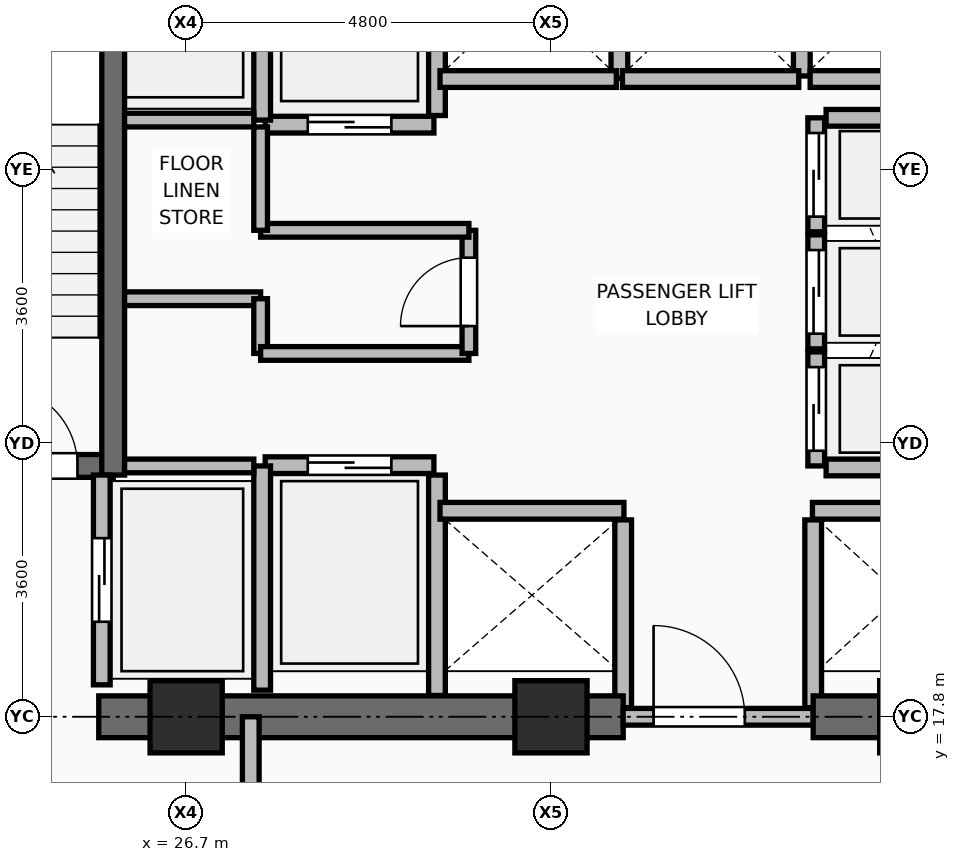
"""IFC4 building model, lengths in metres.
Left out: names, types, materials, properties, quantities, classifications, styles, units other than length and angle.
Written with IfcOpenShell. Run it as: python <this file> out.ifc"""

import sys

from ifc_helpers import new_model, si_unit, direction, frame, frame_2d, origin, origin_2d, place, context, subcontext, project, spatial, rectangle, extrude, element, fill, save


model = new_model("IFC4")
c1 = context("Model", 3, precision=1e-05, world=origin(), true_north=direction((0.0, 1.0)))
c2 = subcontext(c1, "Body", "Model", "MODEL_VIEW")
j1 = project(units=[si_unit("LENGTHUNIT", "METRE"), si_unit("PLANEANGLEUNIT", "RADIAN")], contexts=[c1])
p1 = place(None, origin())
s1 = spatial("IfcSite", under=j1, at=p1, CompositionType="ELEMENT")
p2 = place(p1, origin())
s2 = spatial("IfcBuilding", under=s1, at=p2, CompositionType="ELEMENT")
p3 = place(p2, frame((0.0, 0.0, 145.95)))
s3 = spatial("IfcBuildingStorey", under=s2, at=p3, CompositionType="ELEMENT", Elevation=145.95)
for number, where, z_axis, x_axis in (
    (1, (26.7, 17.8, 0.0), (0.0, 0.0, 1.0), (1.0, 0.0, 0.0)),
    (2, (31.5, 17.8, 0.0), (0.0, 0.0, 1.0), (1.0, 0.0, 0.0)),
    (3, (36.3, 17.8, 0.0), (0.0, 0.0, 1.0), (1.0, 0.0, 0.0)),
):
    element("IfcColumn", number, at=place(p3, frame(where, z_axis=z_axis, x_axis=x_axis)), inside=s3, PredefinedType="COLUMN", context=c2, shape_type="SweptSolid", body=[
        extrude(rectangle(XDim=0.95, YDim=0.95, at=origin_2d()), origin(), (0.0, 0.0, 1.0), 3.75),
    ])
p4 = place(p3, frame((30.0, 18.08, 0.0), z_axis=(0.0, 0.0, 1.0), x_axis=(0.0, 1.0, 0.0)))
e4 = element("IfcWall", 4, at=p4, inside=s3, PredefinedType="PARTITIONING", context=c2, shape_type="SweptSolid", body=[
    extrude(rectangle(XDim=2.9, YDim=0.22, at=frame_2d((1.45, 0.0))), origin(), (0.0, 0.0, 1.0), 3.545),
])
for number, where, z_axis, x_axis in (
    (5, (32.45, 17.92, 0.0), (0.0, 0.0, 1.0), (0.0, 1.0, 0.0)),
    (6, (34.95, 17.92, 0.0), (0.0, 0.0, 1.0), (0.0, 1.0, 0.0)),
):
    element("IfcWall", number, at=place(p3, frame(where, z_axis=z_axis, x_axis=x_axis)), inside=s3, PredefinedType="PARTITIONING", context=c2, shape_type="SweptSolid", body=[
        extrude(rectangle(XDim=2.47, YDim=0.22, at=frame_2d((1.235, 0.0))), origin(), (0.0, 0.0, 1.0), 3.006),
    ])
p5 = place(p3, frame((30.0, 25.71, 0.0), z_axis=(0.0, 0.0, 1.0), x_axis=(0.0, 1.0, 0.0)))
e7 = element("IfcWall", 7, at=p5, inside=s3, PredefinedType="PARTITIONING", context=c2, shape_type="SweptSolid", body=[
    extrude(rectangle(XDim=2.73, YDim=0.22, at=frame_2d((1.365, 0.0))), origin(), (0.0, 0.0, 1.0), 3.545),
])
p6 = place(p3, frame((32.4, 26.2, 0.0), z_axis=(0.0, 0.0, 1.0), x_axis=(0.0, 1.0, 0.0)))
e8 = element("IfcWall", 8, at=p6, inside=s3, PredefinedType="PARTITIONING", context=c2, shape_type="SweptSolid", body=[
    extrude(rectangle(XDim=2.24, YDim=0.22, at=frame_2d((1.12, 0.0))), origin(), (0.0, 0.0, 1.0), 3.545),
])
p7 = place(p3, frame((34.8, 26.23, 0.0), z_axis=(0.0, 0.0, 1.0), x_axis=(0.0, 1.0, 0.0)))
e9 = element("IfcWall", 9, at=p7, inside=s3, PredefinedType="PARTITIONING", context=c2, shape_type="SweptSolid", body=[
    extrude(rectangle(XDim=2.21, YDim=0.22, at=frame_2d((1.105, 0.0))), origin(), (0.0, 0.0, 1.0), 3.545),
])
p8 = place(p3, frame((34.91, 26.19, 0.0), z_axis=(0.0, 0.0, 1.0), x_axis=(1.0, 0.0, 0.0)))
e10 = element("IfcWall", 10, at=p8, inside=s3, PredefinedType="PARTITIONING", context=c2, shape_type="SweptSolid", body=[
    extrude(rectangle(XDim=2.14, YDim=0.22, at=frame_2d((1.07, 0.0))), origin(), (0.0, 0.0, 1.0), 3.545),
])
p9 = place(p3, frame((25.55, 17.8, 0.0), z_axis=(0.0, 0.0, 1.0), x_axis=(1.0, 0.0, 0.0)))
e11 = element("IfcWall", 11, at=p9, inside=s3, PredefinedType="SHEAR", context=c2, shape_type="SweptSolid", body=[
    extrude(rectangle(XDim=6.9, YDim=0.55, at=frame_2d((3.45, 0.0))), origin(), (0.0, 0.0, 1.0), 3.57),
])
p10 = place(p3, frame((32.45, 17.8, 0.0), z_axis=(0.0, 0.0, 1.0), x_axis=(1.0, 0.0, 0.0)))
e12 = element("IfcWall", 12, at=p10, inside=s3, PredefinedType="PARTITIONING", context=c2, shape_type="SweptSolid", body=[
    extrude(rectangle(XDim=2.5, YDim=0.22, at=frame_2d((1.25, 0.0))), origin(), (0.0, 0.0, 1.0), 3.006),
])
p11 = place(p10, frame((0.4, 0.0, 0.0)))
e13 = element("IfcOpeningElement", 13, at=p11, cuts=e12, PredefinedType="OPENING", context=c2, shape_type="SweptSolid", body=[
    extrude(rectangle(XDim=1.2, YDim=2.1, at=frame_2d((0.6, 1.05))), frame((0.0, 0.12, 0.0), z_axis=(0.0, -1.0, 0.0), x_axis=(1.0, 0.0, 0.0)), (0.0, 0.0, 1.0), 0.24),
])
p12 = place(p3, frame((34.95, 17.8, 0.0), z_axis=(0.0, 0.0, 1.0), x_axis=(1.0, 0.0, 0.0)))
e14 = element("IfcWall", 14, at=p12, inside=s3, PredefinedType="SHEAR", context=c2, shape_type="SweptSolid", body=[
    extrude(rectangle(XDim=6.425, YDim=0.55, at=frame_2d((3.212, 0.0))), origin(), (0.0, 0.0, 1.0), 3.57),
])
p13 = place(p3, frame((22.175, 21.1, 0.0), z_axis=(0.0, 0.0, 1.0), x_axis=(1.0, 0.0, 0.0)))
e15 = element("IfcWall", 15, at=p13, inside=s3, PredefinedType="SHEAR", context=c2, shape_type="SweptSolid", body=[
    extrude(rectangle(XDim=3.565, YDim=0.3, at=frame_2d((1.782, 0.0))), origin(), (0.0, 0.0, 1.0), 3.57),
])
p14 = place(p13, frame((2.045, 0.0, 0.0)))
e16 = element("IfcOpeningElement", 16, at=p14, cuts=e15, PredefinedType="OPENING", context=c2, shape_type="SweptSolid", body=[
    extrude(rectangle(XDim=1.05, YDim=2.1, at=frame_2d((0.525, 1.05))), frame((0.0, 0.16, 0.0), z_axis=(0.0, -1.0, 0.0), x_axis=(1.0, 0.0, 0.0)), (0.0, 0.0, 1.0), 0.32),
])
p15 = place(p3, frame((25.74, 20.98, 0.0), z_axis=(0.0, 0.0, 1.0), x_axis=(0.0, 1.0, 0.0)))
e17 = element("IfcWall", 17, at=p15, inside=s3, PredefinedType="SHEAR", context=c2, shape_type="SweptSolid", body=[
    extrude(rectangle(XDim=7.99, YDim=0.3, at=frame_2d((3.995, 0.0))), origin(), (0.0, 0.0, 1.0), 3.57),
])
p16 = place(p3, frame((25.59, 18.22, 0.0), z_axis=(0.0, 0.0, 1.0), x_axis=(0.0, 1.0, 0.0)))
e18 = element("IfcWall", 18, at=p16, inside=s3, PredefinedType="PARTITIONING", context=c2, shape_type="SweptSolid", body=[
    extrude(rectangle(XDim=2.76, YDim=0.22, at=frame_2d((1.38, 0.0))), origin(), (0.0, 0.0, 1.0), 3.55),
])
p17 = place(p16, frame((0.83, 0.0, 0.0)))
e19 = element("IfcOpeningElement", 19, at=p17, cuts=e18, PredefinedType="OPENING", context=c2, shape_type="SweptSolid", body=[
    extrude(rectangle(XDim=1.1, YDim=2.2, at=frame_2d((0.55, 1.1))), frame((0.0, 0.12, 0.0), z_axis=(0.0, -1.0, 0.0), x_axis=(1.0, 0.0, 0.0)), (0.0, 0.0, 1.0), 0.24),
])
p18 = place(p3, frame((27.74, 21.11, 0.0), z_axis=(0.0, 0.0, 1.0), x_axis=(1.0, 0.0, 0.0)))
e20 = element("IfcWall", 20, at=p18, inside=s3, PredefinedType="PARTITIONING", context=c2, shape_type="SweptSolid", body=[
    extrude(rectangle(XDim=2.22, YDim=0.22, at=frame_2d((1.11, 0.0))), origin(), (0.0, 0.0, 1.0), 3.55),
])
p19 = place(p18, frame((0.56, 0.0, 0.0)))
e21 = element("IfcOpeningElement", 21, at=p19, cuts=e20, PredefinedType="OPENING", context=c2, shape_type="SweptSolid", body=[
    extrude(rectangle(XDim=1.1, YDim=2.2, at=frame_2d((0.55, 1.1))), frame((0.0, 0.12, 0.0), z_axis=(0.0, -1.0, 0.0), x_axis=(1.0, 0.0, 0.0)), (0.0, 0.0, 1.0), 0.24),
])
p20 = place(p3, frame((27.74, 25.59, 0.0), z_axis=(0.0, 0.0, 1.0), x_axis=(1.0, 0.0, 0.0)))
e22 = element("IfcWall", 22, at=p20, inside=s3, PredefinedType="PARTITIONING", context=c2, shape_type="SweptSolid", body=[
    extrude(rectangle(XDim=2.22, YDim=0.22, at=frame_2d((1.11, 0.0))), origin(), (0.0, 0.0, 1.0), 3.55),
])
p21 = place(p20, frame((0.56, 0.0, 0.0)))
e23 = element("IfcOpeningElement", 23, at=p21, cuts=e22, PredefinedType="OPENING", context=c2, shape_type="SweptSolid", body=[
    extrude(rectangle(XDim=1.1, YDim=2.2, at=frame_2d((0.55, 1.1))), frame((0.0, 0.12, 0.0), z_axis=(0.0, -1.0, 0.0), x_axis=(1.0, 0.0, 0.0)), (0.0, 0.0, 1.0), 0.24),
])
p22 = place(p3, frame((30.04, 20.51, 0.0), z_axis=(0.0, 0.0, 1.0), x_axis=(1.0, 0.0, 0.0)))
e24 = element("IfcWall", 24, at=p22, inside=s3, PredefinedType="PARTITIONING", context=c2, shape_type="SweptSolid", body=[
    extrude(rectangle(XDim=2.42, YDim=0.22, at=frame_2d((1.21, 0.0))), origin(), (0.0, 0.0, 1.0), 3.55),
])
p23 = place(p3, frame((34.94, 20.51, 0.0), z_axis=(0.0, 0.0, 1.0), x_axis=(1.0, 0.0, 0.0)))
e25 = element("IfcWall", 25, at=p23, inside=s3, PredefinedType="PARTITIONING", context=c2, shape_type="SweptSolid", body=[
    extrude(rectangle(XDim=2.24, YDim=0.22, at=frame_2d((1.12, 0.0))), origin(), (0.0, 0.0, 1.0), 3.55),
])
for number, where, z_axis, x_axis in (
    (26, (30.04, 26.19, 0.0), (0.0, 0.0, 1.0), (1.0, 0.0, 0.0)),
    (27, (32.44, 26.19, 0.0), (0.0, 0.0, 1.0), (1.0, 0.0, 0.0)),
):
    element("IfcWall", number, at=place(p3, frame(where, z_axis=z_axis, x_axis=x_axis)), inside=s3, PredefinedType="PARTITIONING", context=c2, shape_type="SweptSolid", body=[
        extrude(rectangle(XDim=2.32, YDim=0.22, at=frame_2d((1.16, 0.0))), origin(), (0.0, 0.0, 1.0), 3.55),
    ])
p24 = place(p3, frame((34.99, 21.1, 0.0), z_axis=(0.0, 0.0, 1.0), x_axis=(0.0, 1.0, 0.0)))
e28 = element("IfcWall", 28, at=p24, inside=s3, PredefinedType="PARTITIONING", context=c2, shape_type="SweptSolid", body=[
    extrude(rectangle(XDim=1.5, YDim=0.22, at=frame_2d((0.75, 0.0))), origin(), (0.0, 0.0, 1.0), 3.55),
])
p25 = place(p24, frame((0.2, 0.0, 0.0)))
e29 = element("IfcOpeningElement", 29, at=p25, cuts=e28, PredefinedType="OPENING", context=c2, shape_type="SweptSolid", body=[
    extrude(rectangle(XDim=1.1, YDim=2.2, at=frame_2d((0.55, 1.1))), frame((0.0, 0.12, 0.0), z_axis=(0.0, -1.0, 0.0), x_axis=(1.0, 0.0, 0.0)), (0.0, 0.0, 1.0), 0.24),
])
p26 = place(p3, frame((34.99, 22.64, 0.0), z_axis=(0.0, 0.0, 1.0), x_axis=(0.0, 1.0, 0.0)))
e30 = element("IfcWall", 30, at=p26, inside=s3, PredefinedType="PARTITIONING", context=c2, shape_type="SweptSolid", body=[
    extrude(rectangle(XDim=1.5, YDim=0.22, at=frame_2d((0.75, 0.0))), origin(), (0.0, 0.0, 1.0), 3.55),
])
p27 = place(p26, frame((0.2, 0.0, 0.0)))
e31 = element("IfcOpeningElement", 31, at=p27, cuts=e30, PredefinedType="OPENING", context=c2, shape_type="SweptSolid", body=[
    extrude(rectangle(XDim=1.1, YDim=2.2, at=frame_2d((0.55, 1.1))), frame((0.0, 0.12, 0.0), z_axis=(0.0, -1.0, 0.0), x_axis=(1.0, 0.0, 0.0)), (0.0, 0.0, 1.0), 0.24),
])
p28 = place(p3, frame((34.99, 24.18, 0.0), z_axis=(0.0, 0.0, 1.0), x_axis=(0.0, 1.0, 0.0)))
e32 = element("IfcWall", 32, at=p28, inside=s3, PredefinedType="PARTITIONING", context=c2, shape_type="SweptSolid", body=[
    extrude(rectangle(XDim=1.5, YDim=0.22, at=frame_2d((0.75, 0.0))), origin(), (0.0, 0.0, 1.0), 3.55),
])
p29 = place(p28, frame((0.2, 0.0, 0.0)))
e33 = element("IfcOpeningElement", 33, at=p29, cuts=e32, PredefinedType="OPENING", context=c2, shape_type="SweptSolid", body=[
    extrude(rectangle(XDim=1.1, YDim=2.2, at=frame_2d((0.55, 1.1))), frame((0.0, 0.12, 0.0), z_axis=(0.0, -1.0, 0.0), x_axis=(1.0, 0.0, 0.0)), (0.0, 0.0, 1.0), 0.24),
])
p30 = place(p3, frame((27.7, 18.15, 0.0), z_axis=(0.0, 0.0, 1.0), x_axis=(0.0, 1.0, 0.0)))
e34 = element("IfcWall", 34, at=p30, inside=s3, PredefinedType="PARTITIONING", context=c2, shape_type="SweptSolid", body=[
    extrude(rectangle(XDim=2.95, YDim=0.22, at=frame_2d((1.475, 0.0))), origin(), (0.0, 0.0, 1.0), 3.55),
])
p31 = place(p3, frame((27.7, 25.65, 0.0), z_axis=(0.0, 0.0, 1.0), x_axis=(0.0, 1.0, 0.0)))
e35 = element("IfcWall", 35, at=p31, inside=s3, PredefinedType="PARTITIONING", context=c2, shape_type="SweptSolid", body=[
    extrude(rectangle(XDim=3.0, YDim=0.22, at=frame_2d((1.5, 0.0))), origin(), (0.0, 0.0, 1.0), 3.55),
])
for number, where, z_axis, x_axis in (
    (36, (35.12, 21.08, 0.0), (0.0, 0.0, 1.0), (1.0, 0.0, 0.0)),
    (37, (35.12, 25.68, 0.0), (0.0, 0.0, 1.0), (1.0, 0.0, 0.0)),
):
    element("IfcWall", number, at=place(p3, frame(where, z_axis=z_axis, x_axis=x_axis)), inside=s3, PredefinedType="PARTITIONING", context=c2, shape_type="SweptSolid", body=[
        extrude(rectangle(XDim=1.94, YDim=0.22, at=frame_2d((0.97, 0.0))), origin(), (0.0, 0.0, 1.0), 3.55),
    ])
for number, where, z_axis, x_axis in (
    (38, (25.89, 21.1, 0.0), (0.0, 0.0, 1.0), (1.0, 0.0, 0.0)),
    (39, (25.89, 25.65, 0.0), (0.0, 0.0, 1.0), (1.0, 0.0, 0.0)),
):
    element("IfcWall", number, at=place(p3, frame(where, z_axis=z_axis, x_axis=x_axis)), inside=s3, PredefinedType="PARTITIONING", context=c2, shape_type="SweptSolid", body=[
        extrude(rectangle(XDim=1.7, YDim=0.18, at=frame_2d((0.85, 0.0))), origin(), (0.0, 0.0, 1.0), 3.55),
    ])
p32 = place(p3, frame((25.89, 23.3, 0.0), z_axis=(0.0, 0.0, 1.0), x_axis=(1.0, 0.0, 0.0)))
e40 = element("IfcWall", 40, at=p32, inside=s3, PredefinedType="PARTITIONING", context=c2, shape_type="SweptSolid", body=[
    extrude(rectangle(XDim=1.79, YDim=0.18, at=frame_2d((0.895, 0.0))), origin(), (0.0, 0.0, 1.0), 3.55),
])
p33 = place(p3, frame((27.68, 22.58, 0.0), z_axis=(0.0, 0.0, 1.0), x_axis=(0.0, 1.0, 0.0)))
e41 = element("IfcWall", 41, at=p33, inside=s3, PredefinedType="PARTITIONING", context=c2, shape_type="SweptSolid", body=[
    extrude(rectangle(XDim=0.72, YDim=0.18, at=frame_2d((0.36, 0.0))), origin(), (0.0, 0.0, 1.0), 3.55),
])
p34 = place(p3, frame((27.68, 22.58, 0.0), z_axis=(0.0, 0.0, 1.0), x_axis=(1.0, 0.0, 0.0)))
e42 = element("IfcWall", 42, at=p34, inside=s3, PredefinedType="PARTITIONING", context=c2, shape_type="SweptSolid", body=[
    extrude(rectangle(XDim=2.74, YDim=0.18, at=frame_2d((1.37, 0.0))), origin(), (0.0, 0.0, 1.0), 3.55),
])
p35 = place(p3, frame((30.42, 22.58, 0.0), z_axis=(0.0, 0.0, 1.0), x_axis=(0.0, 1.0, 0.0)))
e43 = element("IfcWall", 43, at=p35, inside=s3, PredefinedType="PARTITIONING", context=c2, shape_type="SweptSolid", body=[
    extrude(rectangle(XDim=1.62, YDim=0.18, at=frame_2d((0.81, 0.0))), origin(), (0.0, 0.0, 1.0), 3.55),
])
p36 = place(p35, frame((0.36, 0.0, 0.0)))
e44 = element("IfcOpeningElement", 44, at=p36, cuts=e43, PredefinedType="OPENING", context=c2, shape_type="SweptSolid", body=[
    extrude(rectangle(XDim=0.9, YDim=2.1, at=frame_2d((0.45, 1.05))), frame((0.0, 0.1, 0.0), z_axis=(0.0, -1.0, 0.0), x_axis=(1.0, 0.0, 0.0)), (0.0, 0.0, 1.0), 0.2),
])
p37 = place(p3, frame((27.68, 24.2, 0.0), z_axis=(0.0, 0.0, 1.0), x_axis=(1.0, 0.0, 0.0)))
e45 = element("IfcWall", 45, at=p37, inside=s3, PredefinedType="PARTITIONING", context=c2, shape_type="SweptSolid", body=[
    extrude(rectangle(XDim=2.74, YDim=0.18, at=frame_2d((1.37, 0.0))), origin(), (0.0, 0.0, 1.0), 3.55),
])
p38 = place(p3, frame((27.68, 24.2, 0.0), z_axis=(0.0, 0.0, 1.0), x_axis=(0.0, 1.0, 0.0)))
e46 = element("IfcWall", 46, at=p38, inside=s3, PredefinedType="PARTITIONING", context=c2, shape_type="SweptSolid", body=[
    extrude(rectangle(XDim=1.36, YDim=0.18, at=frame_2d((0.68, 0.0))), origin(), (0.0, 0.0, 1.0), 3.55),
])
p39 = place(p3, frame((27.55, 14.35, 0.0), z_axis=(0.0, 0.0, 1.0), x_axis=(0.0, 1.0, 0.0)))
e47 = element("IfcWall", 47, at=p39, inside=s3, PredefinedType="PARTITIONING", context=c2, shape_type="SweptSolid", body=[
    extrude(rectangle(XDim=3.45, YDim=0.22, at=frame_2d((1.725, 0.0))), origin(), (0.0, 0.0, 1.0), 3.006),
])
p40 = place(p39, frame((1.175, 0.0, 0.0)))
e48 = element("IfcOpeningElement", 48, at=p40, cuts=e47, PredefinedType="OPENING", context=c2, shape_type="SweptSolid", body=[
    extrude(rectangle(XDim=1.1, YDim=2.1, at=frame_2d((0.55, 1.05))), frame((0.0, 0.12, 0.0), z_axis=(0.0, -1.0, 0.0), x_axis=(1.0, 0.0, 0.0)), (0.0, 0.0, 1.0), 0.24),
])
p41 = place(p11, origin())
e49 = element("IfcDoor", 49, at=p41, inside=s3, OperationType="SINGLE_SWING_LEFT", PredefinedType="DOOR", context=c2, shape_type="SweptSolid", body=[
    extrude(rectangle(XDim=1.2, YDim=2.1, at=frame_2d((0.6, 1.05))), frame((0.0, 0.025, 0.0), z_axis=(0.0, -1.0, 0.0), x_axis=(1.0, 0.0, 0.0)), (0.0, 0.0, 1.0), 0.05),
])
fill(e13, e49)
p42 = place(p14, origin())
e50 = element("IfcDoor", 50, at=p42, inside=s3, OperationType="SINGLE_SWING_LEFT", PredefinedType="DOOR", context=c2, shape_type="SweptSolid", body=[
    extrude(rectangle(XDim=1.05, YDim=2.1, at=frame_2d((0.525, 1.05))), frame((0.0, 0.025, 0.0), z_axis=(0.0, -1.0, 0.0), x_axis=(1.0, 0.0, 0.0)), (0.0, 0.0, 1.0), 0.05),
])
fill(e16, e50)
p43 = place(p17, origin())
e51 = element("IfcDoor", 51, at=p43, inside=s3, OperationType="DOUBLE_DOOR_SLIDING", PredefinedType="DOOR", context=c2, shape_type="SweptSolid", body=[
    extrude(rectangle(XDim=1.1, YDim=2.2, at=frame_2d((0.55, 1.1))), frame((0.0, 0.025, 0.0), z_axis=(0.0, -1.0, 0.0), x_axis=(1.0, 0.0, 0.0)), (0.0, 0.0, 1.0), 0.05),
])
fill(e19, e51)
p44 = place(p19, origin())
e52 = element("IfcDoor", 52, at=p44, inside=s3, OperationType="DOUBLE_DOOR_SLIDING", PredefinedType="DOOR", context=c2, shape_type="SweptSolid", body=[
    extrude(rectangle(XDim=1.1, YDim=2.2, at=frame_2d((0.55, 1.1))), frame((0.0, 0.025, 0.0), z_axis=(0.0, -1.0, 0.0), x_axis=(1.0, 0.0, 0.0)), (0.0, 0.0, 1.0), 0.05),
])
fill(e21, e52)
p45 = place(p21, frame((1.1, 0.0, 0.0), z_axis=(0.0, 0.0, 1.0), x_axis=(-1.0, 0.0, 0.0)))
e53 = element("IfcDoor", 53, at=p45, inside=s3, OperationType="DOUBLE_DOOR_SLIDING", PredefinedType="DOOR", context=c2, shape_type="SweptSolid", body=[
    extrude(rectangle(XDim=1.1, YDim=2.2, at=frame_2d((0.55, 1.1))), frame((0.0, 0.025, 0.0), z_axis=(0.0, -1.0, 0.0), x_axis=(1.0, 0.0, 0.0)), (0.0, 0.0, 1.0), 0.05),
])
fill(e23, e53)
p46 = place(p25, origin())
e54 = element("IfcDoor", 54, at=p46, inside=s3, OperationType="DOUBLE_DOOR_SLIDING", PredefinedType="DOOR", context=c2, shape_type="SweptSolid", body=[
    extrude(rectangle(XDim=1.1, YDim=2.2, at=frame_2d((0.55, 1.1))), frame((0.0, 0.025, 0.0), z_axis=(0.0, -1.0, 0.0), x_axis=(1.0, 0.0, 0.0)), (0.0, 0.0, 1.0), 0.05),
])
fill(e29, e54)
p47 = place(p27, origin())
e55 = element("IfcDoor", 55, at=p47, inside=s3, OperationType="DOUBLE_DOOR_SLIDING", PredefinedType="DOOR", context=c2, shape_type="SweptSolid", body=[
    extrude(rectangle(XDim=1.1, YDim=2.2, at=frame_2d((0.55, 1.1))), frame((0.0, 0.025, 0.0), z_axis=(0.0, -1.0, 0.0), x_axis=(1.0, 0.0, 0.0)), (0.0, 0.0, 1.0), 0.05),
])
fill(e31, e55)
p48 = place(p29, origin())
e56 = element("IfcDoor", 56, at=p48, inside=s3, OperationType="DOUBLE_DOOR_SLIDING", PredefinedType="DOOR", context=c2, shape_type="SweptSolid", body=[
    extrude(rectangle(XDim=1.1, YDim=2.2, at=frame_2d((0.55, 1.1))), frame((0.0, 0.025, 0.0), z_axis=(0.0, -1.0, 0.0), x_axis=(1.0, 0.0, 0.0)), (0.0, 0.0, 1.0), 0.05),
])
fill(e33, e56)
p49 = place(p36, origin())
e57 = element("IfcDoor", 57, at=p49, inside=s3, OperationType="SINGLE_SWING_LEFT", PredefinedType="DOOR", context=c2, shape_type="SweptSolid", body=[
    extrude(rectangle(XDim=0.9, YDim=2.1, at=frame_2d((0.45, 1.05))), frame((0.0, 0.025, 0.0), z_axis=(0.0, -1.0, 0.0), x_axis=(1.0, 0.0, 0.0)), (0.0, 0.0, 1.0), 0.05),
])
fill(e44, e57)
save(model, sys.argv[1])
